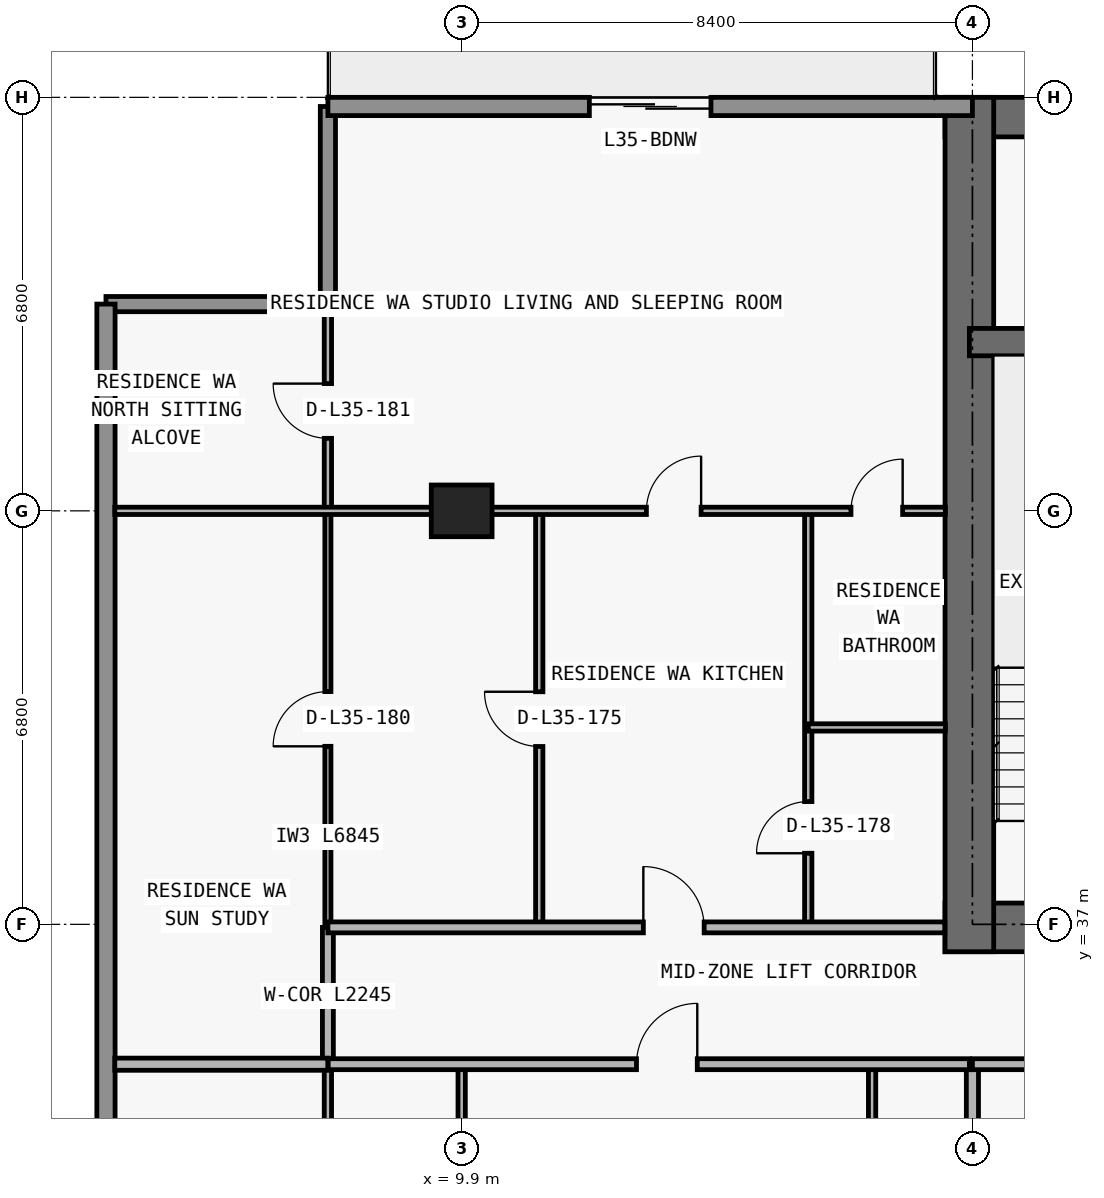
"""IFC4 building model, lengths in metres.
Left out: names, types, materials, properties, quantities, classifications, styles, units other than length and angle.
Written with IfcOpenShell. Run it as: python <this file> out.ifc"""

import sys

from ifc_helpers import new_model, si_unit, direction, frame, frame_2d, origin, origin_2d, place, context, subcontext, project, spatial, rectangle, extrude, element, fill, save


model = new_model("IFC4")
c1 = context("Model", 3, precision=1e-05, world=origin(), true_north=direction((0.0, 1.0)))
c2 = subcontext(c1, "Body", "Model", "MODEL_VIEW")
j1 = project(units=[si_unit("LENGTHUNIT", "METRE"), si_unit("PLANEANGLEUNIT", "RADIAN")], contexts=[c1])
p1 = place(None, origin())
s1 = spatial("IfcSite", under=j1, at=p1, CompositionType="ELEMENT")
p2 = place(p1, origin())
s2 = spatial("IfcBuilding", under=s1, at=p2, CompositionType="ELEMENT")
p3 = place(p2, frame((0.0, 0.0, 129.0)))
s3 = spatial("IfcBuildingStorey", under=s2, at=p3, CompositionType="ELEMENT", Elevation=129.0)
p4 = place(p3, frame((9.9, 43.8, 0.0), z_axis=(0.0, 0.0, 1.0), x_axis=(1.0, 0.0, 0.0)))
e1 = element("IfcColumn", 1, at=p4, inside=s3, PredefinedType="COLUMN", context=c2, shape_type="SweptSolid", body=[
    extrude(rectangle(XDim=1.0, YDim=0.85, at=origin_2d()), origin(), (0.0, 0.0, 1.0), 3.05),
])
p5 = place(p3, frame((17.85, 36.95, 0.0), z_axis=(0.0, 0.0, 1.0), x_axis=(1.0, 0.0, 0.0)))
e2 = element("IfcWall", 2, at=p5, inside=s3, PredefinedType="SHEAR", context=c2, shape_type="SweptSolid", body=[
    extrude(rectangle(XDim=42.1, YDim=0.8, at=frame_2d((21.05, 0.0))), origin(), (0.0, 0.0, 1.0), 3.05),
])
p6 = place(p5, frame((14.45, 0.0, 0.0)))
e3 = element("IfcOpeningElement", 3, at=p6, cuts=e2, PredefinedType="OPENING", context=c2, shape_type="SweptSolid", body=[
    extrude(rectangle(XDim=1.1, YDim=2.15, at=frame_2d((0.55, 1.075))), frame((0.0, 0.41, 0.0), z_axis=(0.0, -1.0, 0.0), x_axis=(1.0, 0.0, 0.0)), (0.0, 0.0, 1.0), 0.82),
])
p7 = place(p5, frame((6.3, 0.0, 0.0)))
e4 = element("IfcOpeningElement", 4, at=p7, cuts=e2, PredefinedType="OPENING", context=c2, shape_type="SweptSolid", body=[
    extrude(rectangle(XDim=1.05, YDim=2.15, at=frame_2d((0.525, 1.075))), frame((0.0, 0.41, 0.0), z_axis=(0.0, -1.0, 0.0), x_axis=(1.0, 0.0, 0.0)), (0.0, 0.0, 1.0), 0.82),
])
p8 = place(p5, frame((34.8, 0.0, 0.0)))
e5 = element("IfcOpeningElement", 5, at=p8, cuts=e2, PredefinedType="OPENING", context=c2, shape_type="SweptSolid", body=[
    extrude(rectangle(XDim=1.05, YDim=2.15, at=frame_2d((0.525, 1.075))), frame((0.0, 0.41, 0.0), z_axis=(0.0, -1.0, 0.0), x_axis=(1.0, 0.0, 0.0)), (0.0, 0.0, 1.0), 0.82),
])
p9 = place(p5, frame((10.913, 0.0, 0.0)))
e6 = element("IfcOpeningElement", 6, at=p9, cuts=e2, PredefinedType="OPENING", context=c2, shape_type="SweptSolid", body=[
    extrude(rectangle(XDim=1.05, YDim=2.15, at=frame_2d((0.525, 1.075))), frame((0.0, 0.41, 0.0), z_axis=(0.0, -1.0, 0.0), x_axis=(1.0, 0.0, 0.0)), (0.0, 0.0, 1.0), 0.82),
])
p10 = place(p5, frame((24.15, 0.0, 0.0)))
e7 = element("IfcOpeningElement", 7, at=p10, cuts=e2, PredefinedType="OPENING", context=c2, shape_type="SweptSolid", body=[
    extrude(rectangle(XDim=1.05, YDim=2.15, at=frame_2d((0.525, 1.075))), frame((0.0, 0.41, 0.0), z_axis=(0.0, -1.0, 0.0), x_axis=(1.0, 0.0, 0.0)), (0.0, 0.0, 1.0), 0.82),
])
p11 = place(p3, frame((17.85, 50.275, 0.0), z_axis=(0.0, 0.0, 1.0), x_axis=(1.0, 0.0, 0.0)))
e8 = element("IfcWall", 8, at=p11, inside=s3, PredefinedType="SHEAR", context=c2, shape_type="SweptSolid", body=[
    extrude(rectangle(XDim=42.1, YDim=0.65, at=frame_2d((21.05, 0.0))), origin(), (0.0, 0.0, 1.0), 3.05),
])
p12 = place(p3, frame((18.25, 36.55, 0.0), z_axis=(0.0, 0.0, 1.0), x_axis=(0.0, 1.0, 0.0)))
e9 = element("IfcWall", 9, at=p12, inside=s3, PredefinedType="SHEAR", context=c2, shape_type="SweptSolid", body=[
    extrude(rectangle(XDim=14.05, YDim=0.8, at=frame_2d((7.025, 0.0))), origin(), (0.0, 0.0, 1.0), 3.05),
])
p13 = place(p3, frame((18.25, 46.575, 0.0), z_axis=(0.0, 0.0, 1.0), x_axis=(1.0, 0.0, 0.0)))
e10 = element("IfcWall", 10, at=p13, inside=s3, PredefinedType="SHEAR", context=c2, shape_type="SweptSolid", body=[
    extrude(rectangle(XDim=41.3, YDim=0.45, at=frame_2d((20.65, 0.0))), origin(), (0.0, 0.0, 1.0), 3.05),
])
p14 = place(p13, frame((7.625, 0.0, 0.0)))
e11 = element("IfcOpeningElement", 11, at=p14, cuts=e10, PredefinedType="OPENING", context=c2, shape_type="SweptSolid", body=[
    extrude(rectangle(XDim=1.05, YDim=2.15, at=frame_2d((0.525, 1.075))), frame((0.0, 0.235, 0.0), z_axis=(0.0, -1.0, 0.0), x_axis=(1.0, 0.0, 0.0)), (0.0, 0.0, 1.0), 0.47),
])
p15 = place(p13, frame((32.675, 0.0, 0.0)))
e12 = element("IfcOpeningElement", 12, at=p15, cuts=e10, PredefinedType="OPENING", context=c2, shape_type="SweptSolid", body=[
    extrude(rectangle(XDim=1.05, YDim=2.15, at=frame_2d((0.525, 1.075))), frame((0.0, 0.235, 0.0), z_axis=(0.0, -1.0, 0.0), x_axis=(1.0, 0.0, 0.0)), (0.0, 0.0, 1.0), 0.47),
])
p16 = place(p3, frame((4.05, 47.2, 0.0), z_axis=(0.0, 0.0, 1.0), x_axis=(1.0, 0.0, 0.0)))
e13 = element("IfcWall", 13, at=p16, inside=s3, PredefinedType="ELEMENTEDWALL", context=c2, shape_type="SweptSolid", body=[
    extrude(rectangle(XDim=3.65, YDim=0.25, at=frame_2d((1.825, 0.0))), origin(), (0.0, 0.0, 1.0), 3.05),
])
p17 = place(p3, frame((7.7, 47.2, 0.0), z_axis=(0.0, 0.0, 1.0), x_axis=(0.0, 1.0, 0.0)))
e14 = element("IfcWall", 14, at=p17, inside=s3, PredefinedType="ELEMENTEDWALL", context=c2, shape_type="SweptSolid", body=[
    extrude(rectangle(XDim=3.25, YDim=0.25, at=frame_2d((1.625, 0.0))), origin(), (0.0, 0.0, 1.0), 3.05),
])
p18 = place(p3, frame((4.05, 28.0, 0.0), z_axis=(0.0, 0.0, 1.0), x_axis=(0.0, 1.0, 0.0)))
e15 = element("IfcWall", 15, at=p18, inside=s3, PredefinedType="STANDARD", context=c2, shape_type="SweptSolid", body=[
    extrude(rectangle(XDim=19.2, YDim=0.3, at=frame_2d((9.6, 0.0))), origin(), (0.0, 0.0, 1.0), 3.05),
])
p19 = place(p3, frame((7.7, 50.45, 0.0), z_axis=(0.0, 0.0, 1.0), x_axis=(1.0, 0.0, 0.0)))
e16 = element("IfcWall", 16, at=p19, inside=s3, PredefinedType="STANDARD", context=c2, shape_type="SweptSolid", body=[
    extrude(rectangle(XDim=10.6, YDim=0.3, at=frame_2d((5.3, 0.0))), origin(), (0.0, 0.0, 1.0), 3.05),
])
p20 = place(p19, frame((4.3, 0.0, 0.0)))
e17 = element("IfcOpeningElement", 17, at=p20, cuts=e16, PredefinedType="OPENING", context=c2, shape_type="SweptSolid", body=[
    extrude(rectangle(XDim=2.0, YDim=2.3, at=frame_2d((1.0, 1.15))), frame((0.0, 0.16, 0.0), z_axis=(0.0, -1.0, 0.0), x_axis=(1.0, 0.0, 0.0)), (0.0, 0.0, 1.0), 0.32),
])
p21 = place(p3, frame((7.7, 26.64, 0.0), z_axis=(0.0, 0.0, 1.0), x_axis=(0.0, 1.0, 0.0)))
e18 = element("IfcWall", 18, at=p21, inside=s3, PredefinedType="PARTITIONING", context=c2, shape_type="SweptSolid", body=[
    extrude(rectangle(XDim=8.06, YDim=0.12, at=frame_2d((4.03, 0.0))), origin(), (0.0, 0.0, 1.0), 3.05),
])
p22 = place(p3, frame((7.7, 34.705, 0.0), z_axis=(0.0, 0.0, 1.0), x_axis=(0.0, 1.0, 0.0)))
e19 = element("IfcWall", 19, at=p22, inside=s3, PredefinedType="PARTITIONING", context=c2, shape_type="SweptSolid", body=[
    extrude(rectangle(XDim=2.245, YDim=0.18, at=frame_2d((1.123, 0.0))), origin(), (0.0, 0.0, 1.0), 3.05),
])
p23 = place(p3, frame((7.7, 36.955, 0.0), z_axis=(0.0, 0.0, 1.0), x_axis=(0.0, 1.0, 0.0)))
e20 = element("IfcWall", 20, at=p23, inside=s3, PredefinedType="MOVABLE", context=c2, shape_type="SweptSolid", body=[
    extrude(rectangle(XDim=6.845, YDim=0.1, at=frame_2d((3.422, 0.0))), origin(), (0.0, 0.0, 1.0), 3.05),
])
p24 = place(p23, frame((2.972, 0.0, 0.0)))
e21 = element("IfcOpeningElement", 21, at=p24, cuts=e20, PredefinedType="OPENING", context=c2, shape_type="SweptSolid", body=[
    extrude(rectangle(XDim=0.9, YDim=2.15, at=frame_2d((0.45, 1.075))), frame((0.0, 0.06, 0.0), z_axis=(0.0, -1.0, 0.0), x_axis=(1.0, 0.0, 0.0)), (0.0, 0.0, 1.0), 0.12),
])
p25 = place(p3, frame((7.7, 43.805, 0.0), z_axis=(0.0, 0.0, 1.0), x_axis=(0.0, 1.0, 0.0)))
e22 = element("IfcWall", 22, at=p25, inside=s3, PredefinedType="PARTITIONING", context=c2, shape_type="SweptSolid", body=[
    extrude(rectangle(XDim=3.275, YDim=0.12, at=frame_2d((1.638, 0.0))), origin(), (0.0, 0.0, 1.0), 3.05),
])
p26 = place(p25, frame((1.188, 0.0, 0.0)))
e23 = element("IfcOpeningElement", 23, at=p26, cuts=e22, PredefinedType="OPENING", context=c2, shape_type="SweptSolid", body=[
    extrude(rectangle(XDim=0.9, YDim=2.15, at=frame_2d((0.45, 1.075))), frame((0.0, 0.07, 0.0), z_axis=(0.0, -1.0, 0.0), x_axis=(1.0, 0.0, 0.0)), (0.0, 0.0, 1.0), 0.14),
])
p27 = place(p3, frame((9.9, 26.64, 0.0), z_axis=(0.0, 0.0, 1.0), x_axis=(0.0, 1.0, 0.0)))
e24 = element("IfcWall", 24, at=p27, inside=s3, PredefinedType="PARTITIONING", context=c2, shape_type="SweptSolid", body=[
    extrude(rectangle(XDim=8.06, YDim=0.12, at=frame_2d((4.03, 0.0))), origin(), (0.0, 0.0, 1.0), 2.174),
])
p28 = place(p3, frame((11.176, 36.95, 0.0), z_axis=(0.0, 0.0, 1.0), x_axis=(0.0, 1.0, 0.0)))
e25 = element("IfcWall", 25, at=p28, inside=s3, PredefinedType="PARTITIONING", context=c2, shape_type="SweptSolid", body=[
    extrude(rectangle(XDim=6.85, YDim=0.12, at=frame_2d((3.425, 0.0))), origin(), (0.0, 0.0, 1.0), 3.05),
])
p29 = place(p28, frame((2.975, 0.0, 0.0)))
e26 = element("IfcOpeningElement", 26, at=p29, cuts=e25, PredefinedType="OPENING", context=c2, shape_type="SweptSolid", body=[
    extrude(rectangle(XDim=0.9, YDim=2.15, at=frame_2d((0.45, 1.075))), frame((0.0, 0.07, 0.0), z_axis=(0.0, -1.0, 0.0), x_axis=(1.0, 0.0, 0.0)), (0.0, 0.0, 1.0), 0.14),
])
p30 = place(p3, frame((15.6, 36.95, 0.0), z_axis=(0.0, 0.0, 1.0), x_axis=(0.0, 1.0, 0.0)))
e27 = element("IfcWall", 27, at=p30, inside=s3, PredefinedType="PARTITIONING", context=c2, shape_type="SweptSolid", body=[
    extrude(rectangle(XDim=6.85, YDim=0.12, at=frame_2d((3.425, 0.0))), origin(), (0.0, 0.0, 1.0), 3.05),
])
p31 = place(p30, frame((1.219, 0.0, 0.0)))
e28 = element("IfcOpeningElement", 28, at=p31, cuts=e27, PredefinedType="OPENING", context=c2, shape_type="SweptSolid", body=[
    extrude(rectangle(XDim=0.85, YDim=2.1, at=frame_2d((0.425, 1.05))), frame((0.0, 0.07, 0.0), z_axis=(0.0, -1.0, 0.0), x_axis=(1.0, 0.0, 0.0)), (0.0, 0.0, 1.0), 0.14),
])
p32 = place(p3, frame((16.65, 26.64, 0.0), z_axis=(0.0, 0.0, 1.0), x_axis=(0.0, 1.0, 0.0)))
e29 = element("IfcWall", 29, at=p32, inside=s3, PredefinedType="PARTITIONING", context=c2, shape_type="SweptSolid", body=[
    extrude(rectangle(XDim=8.06, YDim=0.12, at=frame_2d((4.03, 0.0))), origin(), (0.0, 0.0, 1.0), 3.05),
])
p33 = place(p32, frame((3.755, 0.0, 0.0)))
e30 = element("IfcOpeningElement", 30, at=p33, cuts=e29, PredefinedType="OPENING", context=c2, shape_type="SweptSolid", body=[
    extrude(rectangle(XDim=0.85, YDim=2.1, at=frame_2d((0.425, 1.05))), frame((0.0, 0.07, 0.0), z_axis=(0.0, -1.0, 0.0), x_axis=(1.0, 0.0, 0.0)), (0.0, 0.0, 1.0), 0.14),
])
p34 = place(p3, frame((18.3, 26.64, 0.0), z_axis=(0.0, 0.0, 1.0), x_axis=(0.0, 1.0, 0.0)))
e31 = element("IfcWall", 31, at=p34, inside=s3, PredefinedType="PARTITIONING", context=c2, shape_type="SweptSolid", body=[
    extrude(rectangle(XDim=8.06, YDim=0.2, at=frame_2d((4.03, 0.0))), origin(), (0.0, 0.0, 1.0), 2.174),
])
p35 = place(p3, frame((4.195, 34.7, 0.0), z_axis=(0.0, 0.0, 1.0), x_axis=(1.0, 0.0, 0.0)))
e32 = element("IfcWall", 32, at=p35, inside=s3, PredefinedType="PARTITIONING", context=c2, shape_type="SweptSolid", body=[
    extrude(rectangle(XDim=3.505, YDim=0.2, at=frame_2d((1.752, 0.0))), origin(), (0.0, 0.0, 1.0), 3.05),
])
p36 = place(p3, frame((7.705, 34.7, 0.0), z_axis=(0.0, 0.0, 1.0), x_axis=(1.0, 0.0, 0.0)))
e33 = element("IfcWall", 33, at=p36, inside=s3, PredefinedType="PARTITIONING", context=c2, shape_type="SweptSolid", body=[
    extrude(rectangle(XDim=10.545, YDim=0.18, at=frame_2d((5.272, 0.0))), origin(), (0.0, 0.0, 1.0), 3.05),
])
p37 = place(p36, frame((5.07, 0.0, 0.0)))
e34 = element("IfcOpeningElement", 34, at=p37, cuts=e33, PredefinedType="OPENING", context=c2, shape_type="SweptSolid", body=[
    extrude(rectangle(XDim=1.0, YDim=2.2, at=frame_2d((0.5, 1.1))), frame((0.0, 0.1, 0.0), z_axis=(0.0, -1.0, 0.0), x_axis=(1.0, 0.0, 0.0)), (0.0, 0.0, 1.0), 0.2),
])
p38 = place(p3, frame((18.3, 34.7, 0.0), z_axis=(0.0, 0.0, 1.0), x_axis=(1.0, 0.0, 0.0)))
e35 = element("IfcWall", 35, at=p38, inside=s3, PredefinedType="PARTITIONING", context=c2, shape_type="SweptSolid", body=[
    extrude(rectangle(XDim=8.35, YDim=0.18, at=frame_2d((4.175, 0.0))), origin(), (0.0, 0.0, 1.0), 3.05),
])
p39 = place(p38, frame((2.875, 0.0, 0.0)))
e36 = element("IfcOpeningElement", 36, at=p39, cuts=e35, PredefinedType="OPENING", context=c2, shape_type="SweptSolid", body=[
    extrude(rectangle(XDim=1.0, YDim=2.2, at=frame_2d((0.5, 1.1))), frame((0.0, 0.1, 0.0), z_axis=(0.0, -1.0, 0.0), x_axis=(1.0, 0.0, 0.0)), (0.0, 0.0, 1.0), 0.2),
])
p40 = place(p3, frame((7.7, 36.95, 0.0), z_axis=(0.0, 0.0, 1.0), x_axis=(1.0, 0.0, 0.0)))
e37 = element("IfcWall", 37, at=p40, inside=s3, PredefinedType="PARTITIONING", context=c2, shape_type="SweptSolid", body=[
    extrude(rectangle(XDim=10.145, YDim=0.18, at=frame_2d((5.073, 0.0))), origin(), (0.0, 0.0, 1.0), 3.05),
])
p41 = place(p40, frame((5.188, 0.0, 0.0)))
e38 = element("IfcOpeningElement", 38, at=p41, cuts=e37, PredefinedType="OPENING", context=c2, shape_type="SweptSolid", body=[
    extrude(rectangle(XDim=1.0, YDim=2.2, at=frame_2d((0.5, 1.1))), frame((0.0, 0.1, 0.0), z_axis=(0.0, -1.0, 0.0), x_axis=(1.0, 0.0, 0.0)), (0.0, 0.0, 1.0), 0.2),
])
p42 = place(p3, frame((15.6, 40.238, 0.0), z_axis=(0.0, 0.0, 1.0), x_axis=(1.0, 0.0, 0.0)))
e39 = element("IfcWall", 39, at=p42, inside=s3, PredefinedType="PARTITIONING", context=c2, shape_type="SweptSolid", body=[
    extrude(rectangle(XDim=2.255, YDim=0.12, at=frame_2d((1.127, 0.0))), origin(), (0.0, 0.0, 1.0), 3.05),
])
p43 = place(p3, frame((4.195, 43.8, 0.0), z_axis=(0.0, 0.0, 1.0), x_axis=(1.0, 0.0, 0.0)))
e40 = element("IfcWall", 40, at=p43, inside=s3, PredefinedType="PARTITIONING", context=c2, shape_type="SweptSolid", body=[
    extrude(rectangle(XDim=13.66, YDim=0.12, at=frame_2d((6.83, 0.0))), origin(), (0.0, 0.0, 1.0), 2.339),
])
p44 = place(p43, frame((8.743, 0.0, 0.0)))
e41 = element("IfcOpeningElement", 41, at=p44, cuts=e40, PredefinedType="OPENING", context=c2, shape_type="SweptSolid", body=[
    extrude(rectangle(XDim=0.9, YDim=2.15, at=frame_2d((0.45, 1.075))), frame((0.0, 0.07, 0.0), z_axis=(0.0, -1.0, 0.0), x_axis=(1.0, 0.0, 0.0)), (0.0, 0.0, 1.0), 0.14),
])
p45 = place(p43, frame((12.107, 0.0, 0.0)))
e42 = element("IfcOpeningElement", 42, at=p45, cuts=e40, PredefinedType="OPENING", context=c2, shape_type="SweptSolid", body=[
    extrude(rectangle(XDim=0.85, YDim=2.1, at=frame_2d((0.425, 1.05))), frame((0.0, 0.07, 0.0), z_axis=(0.0, -1.0, 0.0), x_axis=(1.0, 0.0, 0.0)), (0.0, 0.0, 1.0), 0.14),
])
p46 = place(p20, origin())
e43 = element("IfcDoor", 43, at=p46, inside=s3, OperationType="DOUBLE_DOOR_SLIDING", PredefinedType="DOOR", context=c2, shape_type="SweptSolid", body=[
    extrude(rectangle(XDim=2.0, YDim=2.3, at=frame_2d((1.0, 1.15))), frame((0.0, 0.025, 0.0), z_axis=(0.0, -1.0, 0.0), x_axis=(1.0, 0.0, 0.0)), (0.0, 0.0, 1.0), 0.05),
])
fill(e17, e43)
p47 = place(p37, origin())
e44 = element("IfcDoor", 44, at=p47, inside=s3, OperationType="SINGLE_SWING_RIGHT", PredefinedType="DOOR", context=c2, shape_type="SweptSolid", body=[
    extrude(rectangle(XDim=1.0, YDim=2.2, at=frame_2d((0.5, 1.1))), frame((0.0, 0.025, 0.0), z_axis=(0.0, -1.0, 0.0), x_axis=(1.0, 0.0, 0.0)), (0.0, 0.0, 1.0), 0.05),
])
fill(e34, e44)
p48 = place(p29, origin())
e45 = element("IfcDoor", 45, at=p48, inside=s3, OperationType="SINGLE_SWING_RIGHT", PredefinedType="DOOR", context=c2, shape_type="SweptSolid", body=[
    extrude(rectangle(XDim=0.9, YDim=2.15, at=frame_2d((0.45, 1.075))), frame((0.0, 0.025, 0.0), z_axis=(0.0, -1.0, 0.0), x_axis=(1.0, 0.0, 0.0)), (0.0, 0.0, 1.0), 0.05),
])
fill(e26, e45)
p49 = place(p41, origin())
e46 = element("IfcDoor", 46, at=p49, inside=s3, OperationType="SINGLE_SWING_LEFT", PredefinedType="DOOR", context=c2, shape_type="SweptSolid", body=[
    extrude(rectangle(XDim=1.0, YDim=2.2, at=frame_2d((0.5, 1.1))), frame((0.0, 0.025, 0.0), z_axis=(0.0, -1.0, 0.0), x_axis=(1.0, 0.0, 0.0)), (0.0, 0.0, 1.0), 0.05),
])
fill(e38, e46)
p50 = place(p44, origin())
e47 = element("IfcDoor", 47, at=p50, inside=s3, OperationType="SINGLE_SWING_RIGHT", PredefinedType="DOOR", context=c2, shape_type="SweptSolid", body=[
    extrude(rectangle(XDim=0.9, YDim=2.15, at=frame_2d((0.45, 1.075))), frame((0.0, 0.025, 0.0), z_axis=(0.0, -1.0, 0.0), x_axis=(1.0, 0.0, 0.0)), (0.0, 0.0, 1.0), 0.05),
])
fill(e41, e47)
p51 = place(p31, origin())
e48 = element("IfcDoor", 48, at=p51, inside=s3, OperationType="SINGLE_SWING_LEFT", PredefinedType="DOOR", context=c2, shape_type="SweptSolid", body=[
    extrude(rectangle(XDim=0.85, YDim=2.1, at=frame_2d((0.425, 1.05))), frame((0.0, 0.025, 0.0), z_axis=(0.0, -1.0, 0.0), x_axis=(1.0, 0.0, 0.0)), (0.0, 0.0, 1.0), 0.05),
])
fill(e28, e48)
p52 = place(p45, origin())
e49 = element("IfcDoor", 49, at=p52, inside=s3, OperationType="SINGLE_SWING_RIGHT", PredefinedType="DOOR", context=c2, shape_type="SweptSolid", body=[
    extrude(rectangle(XDim=0.85, YDim=2.1, at=frame_2d((0.425, 1.05))), frame((0.0, 0.025, 0.0), z_axis=(0.0, -1.0, 0.0), x_axis=(1.0, 0.0, 0.0)), (0.0, 0.0, 1.0), 0.05),
])
fill(e42, e49)
p53 = place(p24, origin())
e50 = element("IfcDoor", 50, at=p53, inside=s3, OperationType="SINGLE_SWING_LEFT", PredefinedType="DOOR", context=c2, shape_type="SweptSolid", body=[
    extrude(rectangle(XDim=0.9, YDim=2.15, at=frame_2d((0.45, 1.075))), frame((0.0, 0.025, 0.0), z_axis=(0.0, -1.0, 0.0), x_axis=(1.0, 0.0, 0.0)), (0.0, 0.0, 1.0), 0.05),
])
fill(e21, e50)
p54 = place(p26, origin())
e51 = element("IfcDoor", 51, at=p54, inside=s3, OperationType="SINGLE_SWING_RIGHT", PredefinedType="DOOR", context=c2, shape_type="SweptSolid", body=[
    extrude(rectangle(XDim=0.9, YDim=2.15, at=frame_2d((0.45, 1.075))), frame((0.0, 0.025, 0.0), z_axis=(0.0, -1.0, 0.0), x_axis=(1.0, 0.0, 0.0)), (0.0, 0.0, 1.0), 0.05),
])
fill(e23, e51)
save(model, sys.argv[1])
